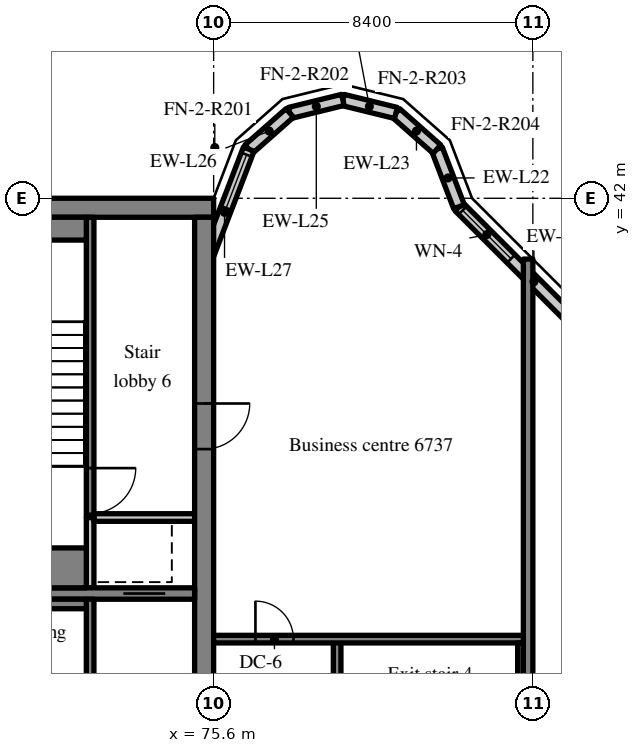
"""IFC4 building model, lengths in metres.
Left out: names, types, materials, properties, quantities, classifications, styles, units other than length and angle.
Written with IfcOpenShell. Run it as: python <this file> out.ifc"""

import sys

from ifc_helpers import new_model, si_unit, direction, frame, frame_2d, origin, place, context, subcontext, project, spatial, rectangle, extrude, source, transform, mapped, element, fill, save


model = new_model("IFC4")
c1 = context("Model", 3, precision=1e-05, world=origin(), true_north=direction((0.0, 1.0)))
c2 = subcontext(c1, "Body", "Model", "MODEL_VIEW")
j1 = project(units=[si_unit("LENGTHUNIT", "METRE"), si_unit("PLANEANGLEUNIT", "RADIAN")], contexts=[c1])
p1 = place(None, origin())
s1 = spatial("IfcSite", under=j1, at=p1, CompositionType="ELEMENT")
p2 = place(p1, origin())
s2 = spatial("IfcBuilding", under=s1, at=p2, CompositionType="ELEMENT")
p3 = place(p2, frame((0.0, 0.0, 281.7)))
s3 = spatial("IfcBuildingStorey", under=s2, at=p3, CompositionType="ELEMENT", Elevation=281.7)
m1 = source(origin(), c2, "Body", "SweptSolid", [
    extrude(rectangle(XDim=50.4, YDim=0.5, at=frame_2d((25.2, 0.0))), origin(), (0.0, 0.0, 1.0), 3.72),
])
p4 = place(p3, frame((25.2, 41.75, 0.0), z_axis=(0.0, 0.0, 1.0), x_axis=(1.0, 0.0, 0.0)))
e1 = element("IfcWall", 1, at=p4, inside=s3, PredefinedType="SHEAR", context=c2, shape_type="MappedRepresentation", body=[
    mapped(m1, transform((0.0, 0.0, 0.0), scale=1.0)),
])
m2 = source(origin(), c2, "Body", "SweptSolid", [
    extrude(rectangle(XDim=19.0, YDim=0.5, at=frame_2d((9.5, 0.0))), origin(), (0.0, 0.0, 1.0), 3.72),
])
p5 = place(p3, frame((75.35, 22.5, 0.0), z_axis=(0.0, 0.0, 1.0), x_axis=(0.0, 1.0, 0.0)))
e2 = element("IfcWall", 2, at=p5, inside=s3, PredefinedType="SHEAR", context=c2, shape_type="MappedRepresentation", body=[
    mapped(m2, transform((0.0, 0.0, 0.0), scale=1.0)),
])
m3 = source(origin(), c2, "Body", "SweptSolid", [
    extrude(rectangle(XDim=1.2, YDim=2.1, at=frame_2d((0.6, 1.05))), frame((0.0, 0.26, 0.0), z_axis=(0.0, -1.0, 0.0), x_axis=(1.0, 0.0, 0.0)), (0.0, 0.0, 1.0), 0.52),
])
p6 = place(p5, frame((12.9, 0.0, 0.0)))
e3 = element("IfcOpeningElement", 3, at=p6, cuts=e2, PredefinedType="OPENING", context=c2, shape_type="MappedRepresentation", body=[
    mapped(m3, transform((0.0, 0.0, 0.0), scale=1.0)),
])
m4 = source(origin(), c2, "Body", "SweptSolid", [
    extrude(rectangle(XDim=7.75, YDim=0.3, at=frame_2d((3.875, 0.0))), origin(), (0.0, 0.0, 1.0), 3.72),
])
p7 = place(p3, frame((67.35, 31.6, 0.0), z_axis=(0.0, 0.0, 1.0), x_axis=(1.0, 0.0, 0.0)))
e4 = element("IfcWall", 4, at=p7, inside=s3, PredefinedType="SHEAR", context=c2, shape_type="MappedRepresentation", body=[
    mapped(m4, transform((0.0, 0.0, 0.0), scale=1.0)),
])
m5 = source(origin(), c2, "Body", "SweptSolid", [
    extrude(rectangle(XDim=1.1, YDim=2.1, at=frame_2d((0.55, 1.05))), frame((0.0, 0.16, 0.0), z_axis=(0.0, -1.0, 0.0), x_axis=(1.0, 0.0, 0.0)), (0.0, 0.0, 1.0), 0.32),
])
p8 = place(p7, frame((5.875, 0.0, 0.0)))
e5 = element("IfcOpeningElement", 5, at=p8, cuts=e4, PredefinedType="OPENING", context=c2, shape_type="MappedRepresentation", body=[
    mapped(m5, transform((0.0, 0.0, 0.0), scale=1.0)),
])
m6 = source(origin(), c2, "Body", "SweptSolid", [
    extrude(rectangle(XDim=18.4, YDim=0.25, at=frame_2d((9.2, 0.0))), origin(), (0.0, 0.0, 1.0), 3.72),
])
p9 = place(p3, frame((83.875, 22.0, 0.0), z_axis=(0.0, 0.0, 1.0), x_axis=(0.0, 1.0, 0.0)))
e6 = element("IfcWall", 6, at=p9, inside=s3, PredefinedType="SHEAR", context=c2, shape_type="MappedRepresentation", body=[
    mapped(m6, transform((0.0, 0.0, 0.0), scale=1.0)),
])
m7 = source(origin(), c2, "Body", "SweptSolid", [
    extrude(rectangle(XDim=5.576, YDim=0.3, at=frame_2d((2.788, 0.0))), origin(), (0.0, 0.0, 1.0), 3.72),
])
p10 = place(p3, frame((86.0, 37.834, 0.0), z_axis=(0.0, 0.0, 1.0), x_axis=(-0.707106781187, 0.707106781187, 0.0)))
e7 = element("IfcWall", 7, at=p10, inside=s3, PredefinedType="SOLIDWALL", context=c2, shape_type="MappedRepresentation", body=[
    mapped(m7, transform((0.0, 0.0, 0.0), scale=1.0)),
])
m8 = source(origin(), c2, "Body", "SweptSolid", [
    extrude(rectangle(XDim=1.8, YDim=1.5, at=frame_2d((0.9, 0.75))), frame((0.0, 0.16, 0.0), z_axis=(0.0, -1.0, 0.0), x_axis=(1.0, 0.0, 0.0)), (0.0, 0.0, 1.0), 0.32),
])
p11 = place(p10, frame((3.641, 0.0, 0.9)))
e8 = element("IfcOpeningElement", 8, at=p11, cuts=e7, PredefinedType="OPENING", context=c2, shape_type="MappedRepresentation", body=[
    mapped(m8, transform((0.0, 0.0, 0.0), scale=1.0)),
])
m9 = source(origin(), c2, "Body", "SweptSolid", [
    extrude(rectangle(XDim=1.622, YDim=0.3, at=frame_2d((0.811, 0.0))), origin(), (0.0, 0.0, 1.0), 3.72),
])
p12 = place(p3, frame((82.057, 41.777, 0.0), z_axis=(0.0, 0.0, 1.0), x_axis=(-0.357778527068, 0.933806471154, 0.0)))
e9 = element("IfcWall", 9, at=p12, inside=s3, PredefinedType="SOLIDWALL", context=c2, shape_type="MappedRepresentation", body=[
    mapped(m9, transform((0.0, 0.0, 0.0), scale=1.0)),
])
m10 = source(origin(), c2, "Body", "SweptSolid", [
    extrude(rectangle(XDim=1.44, YDim=0.3, at=frame_2d((0.72, 0.0))), origin(), (0.0, 0.0, 1.0), 3.72),
])
p13 = place(p3, frame((81.477, 43.292, 0.0), z_axis=(0.0, 0.0, 1.0), x_axis=(-0.74957555648, 0.661918790432, 0.0)))
e10 = element("IfcWall", 10, at=p13, inside=s3, PredefinedType="SOLIDWALL", context=c2, shape_type="MappedRepresentation", body=[
    mapped(m10, transform((0.0, 0.0, 0.0), scale=1.0)),
])
m11 = source(origin(), c2, "Body", "SweptSolid", [
    extrude(rectangle(XDim=1.439, YDim=0.3, at=frame_2d((0.719, 0.0))), origin(), (0.0, 0.0, 1.0), 3.72),
])
for number, where, z_axis, x_axis in (
    (11, (80.397, 44.245, 0.0), (0.0, 0.0, 1.0), (-0.971, 0.238, 0.0)),
    (12, (79.0, 44.588, 0.0), (0.0, 0.0, 1.0), (-0.971, -0.238, 0.0)),
):
    element("IfcWall", number, at=place(p3, frame(where, z_axis=z_axis, x_axis=x_axis)), inside=s3, PredefinedType="SOLIDWALL", context=c2, shape_type="MappedRepresentation", body=[
        mapped(m11, transform((0.0, 0.0, 0.0), scale=1.0)),
    ])
p14 = place(p3, frame((77.603, 44.245, 0.0), z_axis=(0.0, 0.0, 1.0), x_axis=(-0.74957555648, -0.661918790432, 0.0)))
e13 = element("IfcWall", 13, at=p14, inside=s3, PredefinedType="SOLIDWALL", context=c2, shape_type="MappedRepresentation", body=[
    mapped(m10, transform((0.0, 0.0, 0.0), scale=1.0)),
])
m12 = source(origin(), c2, "Body", "SweptSolid", [
    extrude(rectangle(XDim=3.559, YDim=0.3, at=frame_2d((1.78, 0.0))), origin(), (0.0, 0.0, 1.0), 3.72),
])
p15 = place(p3, frame((76.523, 43.292, 0.0), z_axis=(0.0, 0.0, 1.0), x_axis=(-0.35779745313, -0.933799219604, 0.0)))
e14 = element("IfcWall", 14, at=p15, inside=s3, PredefinedType="SOLIDWALL", context=c2, shape_type="MappedRepresentation", body=[
    mapped(m12, transform((0.0, 0.0, 0.0), scale=1.0)),
])
m13 = source(origin(), c2, "Body", "SweptSolid", [
    extrude(rectangle(XDim=1.5, YDim=2.0, at=frame_2d((0.75, 1.0))), frame((0.0, 0.16, 0.0), z_axis=(0.0, -1.0, 0.0), x_axis=(1.0, 0.0, 0.0)), (0.0, 0.0, 1.0), 0.32),
])
p16 = place(p15, frame((0.156, 0.0, 0.9)))
e15 = element("IfcOpeningElement", 15, at=p16, cuts=e14, PredefinedType="OPENING", context=c2, shape_type="MappedRepresentation", body=[
    mapped(m13, transform((0.0, 0.0, 0.0), scale=1.0)),
])
m14 = source(origin(), c2, "Body", "SweptSolid", [
    extrude(rectangle(XDim=8.95, YDim=0.2, at=frame_2d((4.475, 0.0))), origin(), (0.0, 0.0, 1.0), 3.72),
])
p17 = place(p3, frame((72.35, 22.5, 0.0), z_axis=(0.0, 0.0, 1.0), x_axis=(0.0, 1.0, 0.0)))
e16 = element("IfcWall", 16, at=p17, inside=s3, PredefinedType="SOLIDWALL", context=c2, shape_type="MappedRepresentation", body=[
    mapped(m14, transform((0.0, 0.0, 0.0), scale=1.0)),
])
m15 = source(origin(), c2, "Body", "SweptSolid", [
    extrude(rectangle(XDim=1.2, YDim=2.1, at=frame_2d((0.6, 1.05))), frame((0.0, 0.11, 0.0), z_axis=(0.0, -1.0, 0.0), x_axis=(1.0, 0.0, 0.0)), (0.0, 0.0, 1.0), 0.22),
])
p18 = place(p17, frame((1.1, 0.0, 0.0)))
e17 = element("IfcOpeningElement", 17, at=p18, cuts=e16, PredefinedType="OPENING", context=c2, shape_type="MappedRepresentation", body=[
    mapped(m15, transform((0.0, 0.0, 0.0), scale=1.0)),
])
m16 = source(origin(), c2, "Body", "SweptSolid", [
    extrude(rectangle(XDim=1.85, YDim=0.2, at=frame_2d((0.925, 0.0))), origin(), (0.0, 0.0, 1.0), 3.72),
])
p19 = place(p3, frame((72.35, 31.75, 0.0), z_axis=(0.0, 0.0, 1.0), x_axis=(0.0, 1.0, 0.0)))
e18 = element("IfcWall", 18, at=p19, inside=s3, PredefinedType="SOLIDWALL", context=c2, shape_type="MappedRepresentation", body=[
    mapped(m16, transform((0.0, 0.0, 0.0), scale=1.0)),
])
m17 = source(origin(), c2, "Body", "SweptSolid", [
    extrude(rectangle(XDim=2.65, YDim=0.2, at=frame_2d((1.325, 0.0))), origin(), (0.0, 0.0, 1.0), 3.72),
])
p20 = place(p3, frame((72.45, 33.6, 0.0), z_axis=(0.0, 0.0, 1.0), x_axis=(1.0, 0.0, 0.0)))
e19 = element("IfcWall", 19, at=p20, inside=s3, PredefinedType="SOLIDWALL", context=c2, shape_type="MappedRepresentation", body=[
    mapped(m17, transform((0.0, 0.0, 0.0), scale=1.0)),
])
m18 = source(origin(), c2, "Body", "SweptSolid", [
    extrude(rectangle(XDim=7.9, YDim=0.2, at=frame_2d((3.95, 0.0))), origin(), (0.0, 0.0, 1.0), 3.72),
])
p21 = place(p3, frame((72.35, 33.6, 0.0), z_axis=(0.0, 0.0, 1.0), x_axis=(0.0, 1.0, 0.0)))
e20 = element("IfcWall", 20, at=p21, inside=s3, PredefinedType="SOLIDWALL", context=c2, shape_type="MappedRepresentation", body=[
    mapped(m18, transform((0.0, 0.0, 0.0), scale=1.0)),
])
p22 = place(p21, frame((0.1, 0.0, 0.0)))
e21 = element("IfcOpeningElement", 21, at=p22, cuts=e20, PredefinedType="OPENING", context=c2, shape_type="MappedRepresentation", body=[
    mapped(m15, transform((0.0, 0.0, 0.0), scale=1.0)),
])
m19 = source(origin(), c2, "Body", "SweptSolid", [
    extrude(rectangle(XDim=8.3, YDim=0.2, at=frame_2d((4.15, 0.0))), origin(), (0.0, 0.0, 1.0), 3.72),
])
p23 = place(p3, frame((78.85, 22.1, 0.0), z_axis=(0.0, 0.0, 1.0), x_axis=(0.0, 1.0, 0.0)))
e22 = element("IfcWall", 22, at=p23, inside=s3, PredefinedType="SOLIDWALL", context=c2, shape_type="MappedRepresentation", body=[
    mapped(m19, transform((0.0, 0.0, 0.0), scale=1.0)),
])
p24 = place(p23, frame((0.6, 0.0, 0.0)))
e23 = element("IfcOpeningElement", 23, at=p24, cuts=e22, PredefinedType="OPENING", context=c2, shape_type="MappedRepresentation", body=[
    mapped(m15, transform((0.0, 0.0, 0.0), scale=1.0)),
])
m20 = source(origin(), c2, "Body", "SweptSolid", [
    extrude(rectangle(XDim=8.15, YDim=0.2, at=frame_2d((4.075, 0.0))), origin(), (0.0, 0.0, 1.0), 3.72),
])
p25 = place(p3, frame((83.75, 30.4, 0.0), z_axis=(0.0, 0.0, 1.0), x_axis=(-1.0, 0.0, 0.0)))
e24 = element("IfcWall", 24, at=p25, inside=s3, PredefinedType="SOLIDWALL", context=c2, shape_type="MappedRepresentation", body=[
    mapped(m20, transform((0.0, 0.0, 0.0), scale=1.0)),
])
m21 = source(origin(), c2, "Body", "SweptSolid", [
    extrude(rectangle(XDim=1.0, YDim=2.1, at=frame_2d((0.5, 1.05))), frame((0.0, 0.11, 0.0), z_axis=(0.0, -1.0, 0.0), x_axis=(1.0, 0.0, 0.0)), (0.0, 0.0, 1.0), 0.22),
])
p26 = place(p25, frame((6.05, 0.0, 0.0)))
e25 = element("IfcOpeningElement", 25, at=p26, cuts=e24, PredefinedType="OPENING", context=c2, shape_type="MappedRepresentation", body=[
    mapped(m21, transform((0.0, 0.0, 0.0), scale=1.0)),
])
m22 = source(origin(), c2, "Body", "SweptSolid", [
    extrude(rectangle(XDim=4.9, YDim=0.25, at=frame_2d((2.45, 0.0))), origin(), (0.0, 0.0, 1.0), 3.72),
])
p27 = place(p3, frame((67.35, 31.325, 0.0), z_axis=(0.0, 0.0, 1.0), x_axis=(1.0, 0.0, 0.0)))
e26 = element("IfcWall", 26, at=p27, inside=s3, PredefinedType="SOLIDWALL", context=c2, shape_type="MappedRepresentation", body=[
    mapped(m22, transform((0.0, 0.0, 0.0), scale=1.0)),
])
m23 = source(origin(), c2, "Body", "SweptSolid", [
    extrude(rectangle(XDim=4.9, YDim=0.6, at=frame_2d((2.45, 0.0))), origin(), (0.0, 0.0, 1.0), 3.72),
])
p28 = place(p3, frame((67.35, 41.2, 0.0), z_axis=(0.0, 0.0, 1.0), x_axis=(1.0, 0.0, 0.0)))
e27 = element("IfcWall", 27, at=p28, inside=s3, PredefinedType="SOLIDWALL", context=c2, shape_type="MappedRepresentation", body=[
    mapped(m23, transform((0.0, 0.0, 0.0), scale=1.0)),
])
m24 = source(origin(), c2, "Body", "SweptSolid", [
    extrude(rectangle(XDim=4.9, YDim=1.05, at=frame_2d((2.45, 0.0))), origin(), (0.0, 0.0, 1.0), 3.72),
])
p29 = place(p3, frame((67.35, 32.275, 0.0), z_axis=(0.0, 0.0, 1.0), x_axis=(1.0, 0.0, 0.0)))
e28 = element("IfcWall", 28, at=p29, inside=s3, PredefinedType="SOLIDWALL", context=c2, shape_type="MappedRepresentation", body=[
    mapped(m24, transform((0.0, 0.0, 0.0), scale=1.0)),
])
m25 = source(origin(), c2, "Body", "SweptSolid", [
    extrude(rectangle(XDim=8.1, YDim=0.15, at=frame_2d((4.05, 0.0))), origin(), (0.0, 0.0, 1.0), 3.72),
])
p30 = place(p3, frame((83.675, 22.2, 0.0), z_axis=(0.0, 0.0, 1.0), x_axis=(0.0, 1.0, 0.0)))
e29 = element("IfcWall", 29, at=p30, inside=s3, PredefinedType="SOLIDWALL", context=c2, shape_type="MappedRepresentation", body=[
    mapped(m25, transform((0.0, 0.0, 0.0), scale=1.0)),
])
m26 = source(origin(), c2, "Body", "SweptSolid", [
    extrude(rectangle(XDim=1.8, YDim=1.5, at=frame_2d((0.9, 0.75))), frame((0.0, 0.03, 0.0), z_axis=(0.0, -1.0, 0.0), x_axis=(1.0, 0.0, 0.0)), (0.0, 0.0, 1.0), 0.06),
])
p31 = place(p11, origin())
e30 = element("IfcWindow", 30, at=p31, inside=s3, PartitioningType="SINGLE_PANEL", PredefinedType="WINDOW", context=c2, shape_type="MappedRepresentation", body=[
    mapped(m26, transform((0.0, 0.0, 0.0), scale=1.0)),
])
fill(e8, e30)
m27 = source(origin(), c2, "Body", "SweptSolid", [
    extrude(rectangle(XDim=1.5, YDim=2.0, at=frame_2d((0.75, 1.0))), frame((0.0, 0.03, 0.0), z_axis=(0.0, -1.0, 0.0), x_axis=(1.0, 0.0, 0.0)), (0.0, 0.0, 1.0), 0.06),
])
p32 = place(p16, origin())
e31 = element("IfcWindow", 31, at=p32, inside=s3, PartitioningType="SINGLE_PANEL", PredefinedType="WINDOW", context=c2, shape_type="MappedRepresentation", body=[
    mapped(m27, transform((0.0, 0.0, 0.0), scale=1.0)),
])
fill(e15, e31)
m28 = source(origin(), c2, "Body", "SweptSolid", [
    extrude(rectangle(XDim=1.1, YDim=2.1, at=frame_2d((0.55, 1.05))), frame((0.0, 0.025, 0.0), z_axis=(0.0, -1.0, 0.0), x_axis=(1.0, 0.0, 0.0)), (0.0, 0.0, 1.0), 0.05),
])
p33 = place(p8, origin())
e32 = element("IfcDoor", 32, at=p33, inside=s3, OperationType="SLIDING_TO_RIGHT", PredefinedType="DOOR", context=c2, shape_type="MappedRepresentation", body=[
    mapped(m28, transform((0.0, 0.0, 0.0), scale=1.0)),
])
fill(e5, e32)
m29 = source(origin(), c2, "Body", "SweptSolid", [
    extrude(rectangle(XDim=1.2, YDim=2.1, at=frame_2d((0.6, 1.05))), frame((0.0, 0.025, 0.0), z_axis=(0.0, -1.0, 0.0), x_axis=(1.0, 0.0, 0.0)), (0.0, 0.0, 1.0), 0.05),
])
p34 = place(p22, origin())
e33 = element("IfcDoor", 33, at=p34, inside=s3, OperationType="SINGLE_SWING_RIGHT", PredefinedType="DOOR", context=c2, shape_type="MappedRepresentation", body=[
    mapped(m29, transform((0.0, 0.0, 0.0), scale=1.0)),
])
fill(e21, e33)
p35 = place(p6, origin())
e34 = element("IfcDoor", 34, at=p35, inside=s3, OperationType="SINGLE_SWING_RIGHT", PredefinedType="DOOR", context=c2, shape_type="MappedRepresentation", body=[
    mapped(m29, transform((0.0, 0.0, 0.0), scale=1.0)),
])
fill(e3, e34)
m30 = source(origin(), c2, "Body", "SweptSolid", [
    extrude(rectangle(XDim=1.0, YDim=2.1, at=frame_2d((0.5, 1.05))), frame((0.0, 0.025, 0.0), z_axis=(0.0, -1.0, 0.0), x_axis=(1.0, 0.0, 0.0)), (0.0, 0.0, 1.0), 0.05),
])
p36 = place(p26, origin())
e35 = element("IfcDoor", 35, at=p36, inside=s3, OperationType="SINGLE_SWING_RIGHT", PredefinedType="DOOR", context=c2, shape_type="MappedRepresentation", body=[
    mapped(m30, transform((0.0, 0.0, 0.0), scale=1.0)),
])
fill(e25, e35)
save(model, sys.argv[1])
